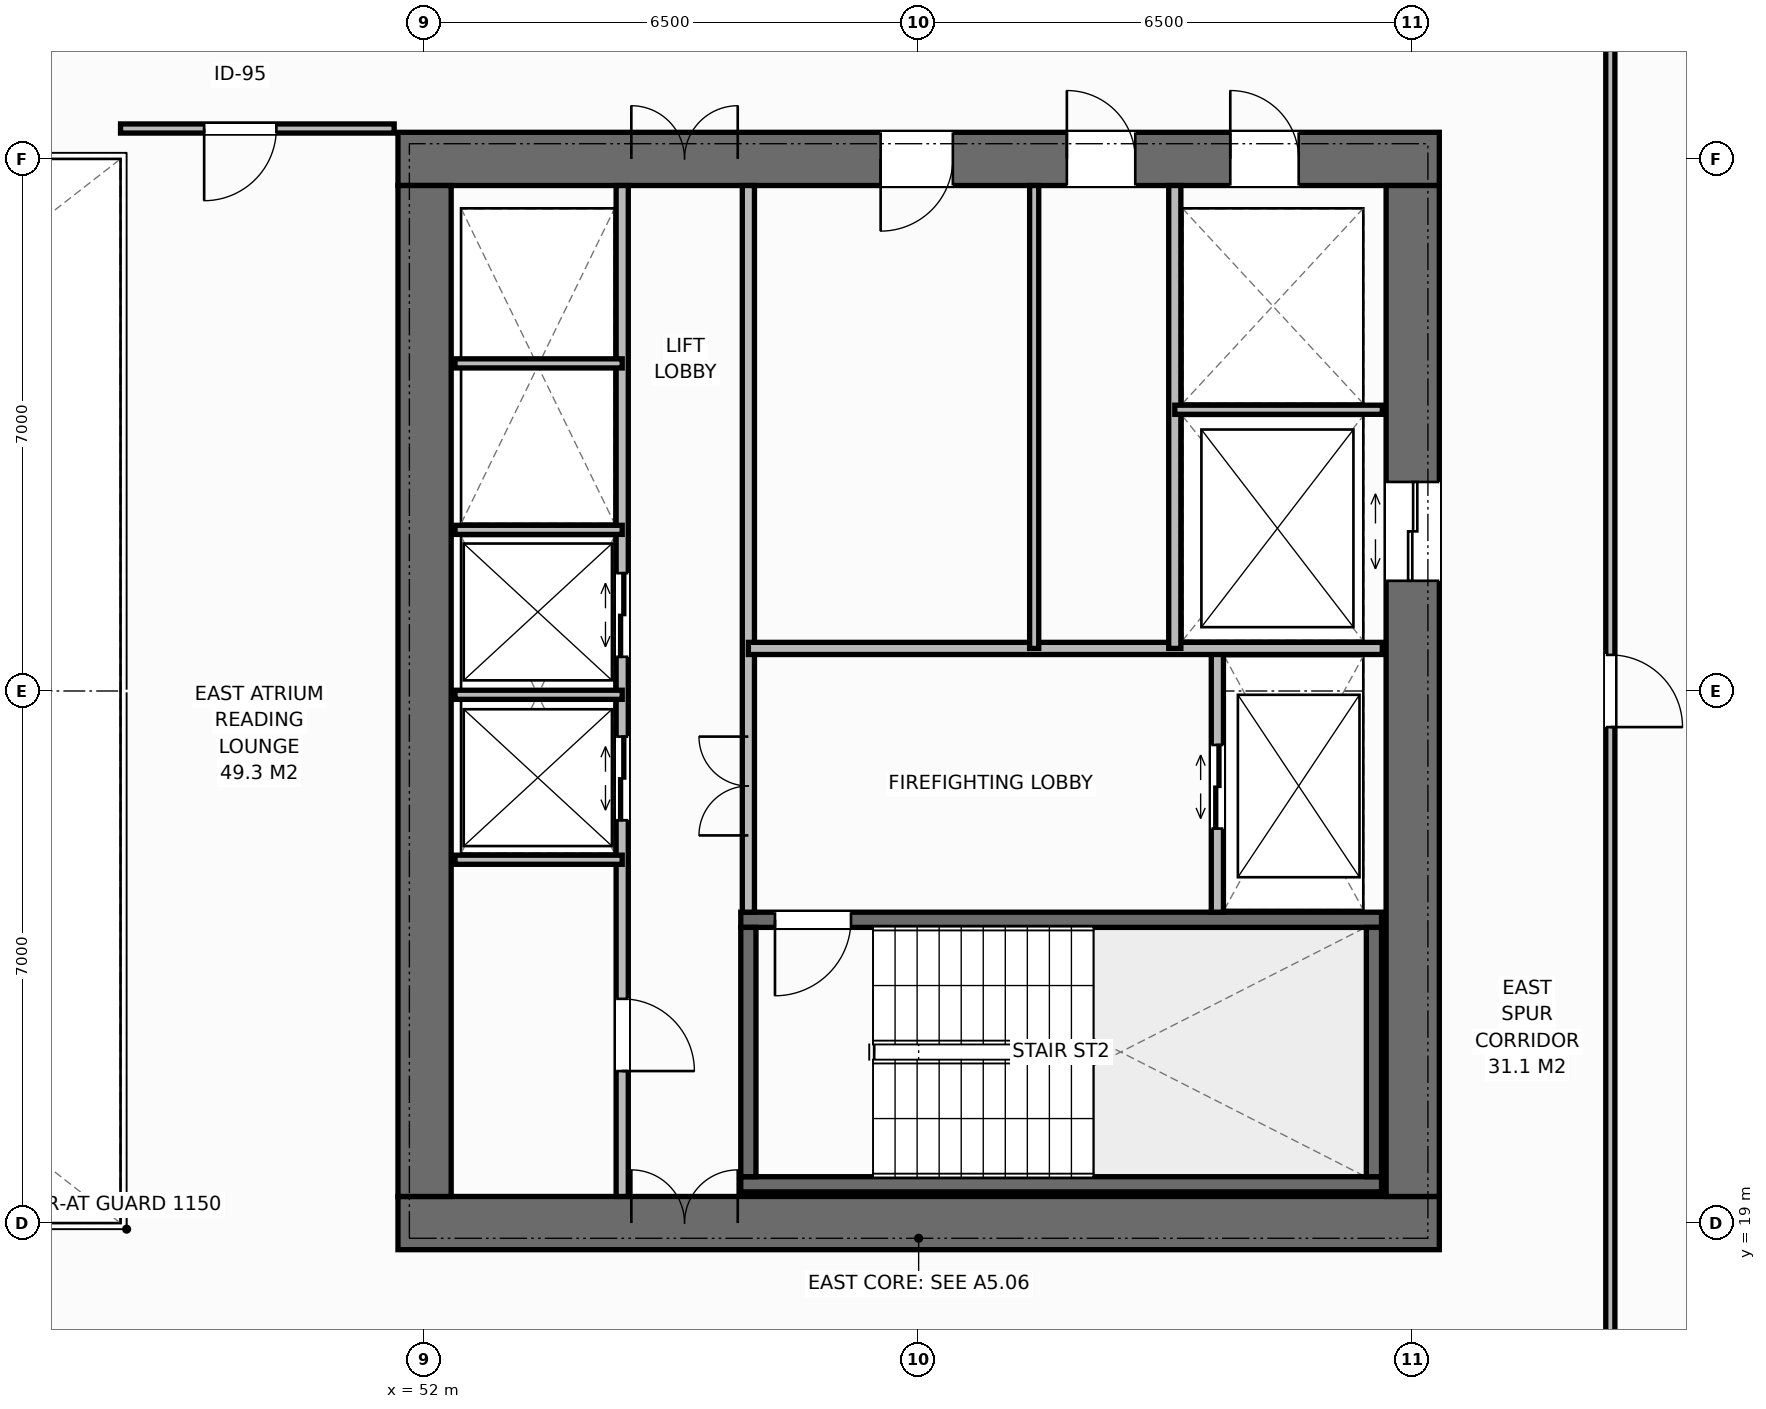
"""IFC4 building model, lengths in metres.
Left out: names, types, materials, properties, quantities, classifications, styles, units other than length and angle.
Written with IfcOpenShell. Run it as: python <this file> out.ifc"""

import sys

from ifc_helpers import new_model, si_unit, direction, frame, frame_2d, origin, place, context, subcontext, project, spatial, rectangle, extrude, element, fill, save


model = new_model("IFC4")
c1 = context("Model", 3, precision=1e-05, world=origin(), true_north=direction((0.0, 1.0)))
c2 = subcontext(c1, "Body", "Model", "MODEL_VIEW")
j1 = project(units=[si_unit("LENGTHUNIT", "METRE"), si_unit("PLANEANGLEUNIT", "RADIAN")], contexts=[c1])
p1 = place(None, origin())
s1 = spatial("IfcSite", under=j1, at=p1, CompositionType="ELEMENT")
p2 = place(p1, origin())
s2 = spatial("IfcBuilding", under=s1, at=p2, CompositionType="ELEMENT")
p3 = place(p2, frame((0.0, 0.0, 124.0)))
s3 = spatial("IfcBuildingStorey", under=s2, at=p3, CompositionType="ELEMENT", Elevation=124.0)
p4 = place(p3, frame((51.65, 19.0, 0.0), z_axis=(0.0, 0.0, 1.0), x_axis=(1.0, 0.0, 0.0)))
e1 = element("IfcWall", 1, at=p4, inside=s3, PredefinedType="SHEAR", context=c2, shape_type="SweptSolid", body=[
    extrude(rectangle(XDim=13.7, YDim=0.7, at=frame_2d((6.85, 0.0))), origin(), (0.0, 0.0, 1.0), 3.8),
])
p5 = place(p4, frame((3.07, 0.0, 0.0)))
e2 = element("IfcOpeningElement", 2, at=p5, cuts=e1, PredefinedType="OPENING", context=c2, shape_type="SweptSolid", body=[
    extrude(rectangle(XDim=1.4, YDim=2.2, at=frame_2d((0.7, 1.1))), frame((0.0, 0.36, 0.0), z_axis=(0.0, -1.0, 0.0), x_axis=(1.0, 0.0, 0.0)), (0.0, 0.0, 1.0), 0.72),
])
p6 = place(p3, frame((51.65, 33.0, 0.0), z_axis=(0.0, 0.0, 1.0), x_axis=(1.0, 0.0, 0.0)))
e3 = element("IfcWall", 3, at=p6, inside=s3, PredefinedType="SHEAR", context=c2, shape_type="SweptSolid", body=[
    extrude(rectangle(XDim=13.7, YDim=0.7, at=frame_2d((6.85, 0.0))), origin(), (0.0, 0.0, 1.0), 3.8),
])
p7 = place(p6, frame((3.07, 0.0, 0.0)))
e4 = element("IfcOpeningElement", 4, at=p7, cuts=e3, PredefinedType="OPENING", context=c2, shape_type="SweptSolid", body=[
    extrude(rectangle(XDim=1.4, YDim=2.2, at=frame_2d((0.7, 1.1))), frame((0.0, 0.36, 0.0), z_axis=(0.0, -1.0, 0.0), x_axis=(1.0, 0.0, 0.0)), (0.0, 0.0, 1.0), 0.72),
])
p8 = place(p6, frame((10.95, 0.0, 0.0)))
e5 = element("IfcOpeningElement", 5, at=p8, cuts=e3, PredefinedType="OPENING", context=c2, shape_type="SweptSolid", body=[
    extrude(rectangle(XDim=0.9, YDim=2.15, at=frame_2d((0.45, 1.075))), frame((0.0, 0.36, 0.0), z_axis=(0.0, -1.0, 0.0), x_axis=(1.0, 0.0, 0.0)), (0.0, 0.0, 1.0), 0.72),
])
p9 = place(p6, frame((6.35, 0.0, 0.0)))
e6 = element("IfcOpeningElement", 6, at=p9, cuts=e3, PredefinedType="OPENING", context=c2, shape_type="SweptSolid", body=[
    extrude(rectangle(XDim=0.95, YDim=2.15, at=frame_2d((0.475, 1.075))), frame((0.0, 0.36, 0.0), z_axis=(0.0, -1.0, 0.0), x_axis=(1.0, 0.0, 0.0)), (0.0, 0.0, 1.0), 0.72),
])
p10 = place(p6, frame((8.8, 0.0, 0.0)))
e7 = element("IfcOpeningElement", 7, at=p10, cuts=e3, PredefinedType="OPENING", context=c2, shape_type="SweptSolid", body=[
    extrude(rectangle(XDim=0.9, YDim=2.15, at=frame_2d((0.45, 1.075))), frame((0.0, 0.36, 0.0), z_axis=(0.0, -1.0, 0.0), x_axis=(1.0, 0.0, 0.0)), (0.0, 0.0, 1.0), 0.72),
])
p11 = place(p3, frame((52.0, 19.35, 0.0), z_axis=(0.0, 0.0, 1.0), x_axis=(0.0, 1.0, 0.0)))
e8 = element("IfcWall", 8, at=p11, inside=s3, PredefinedType="SHEAR", context=c2, shape_type="SweptSolid", body=[
    extrude(rectangle(XDim=13.3, YDim=0.7, at=frame_2d((6.65, 0.0))), origin(), (0.0, 0.0, 1.0), 3.8),
])
p12 = place(p3, frame((65.0, 19.35, 0.0), z_axis=(0.0, 0.0, 1.0), x_axis=(0.0, 1.0, 0.0)))
e9 = element("IfcWall", 9, at=p12, inside=s3, PredefinedType="SHEAR", context=c2, shape_type="SweptSolid", body=[
    extrude(rectangle(XDim=13.3, YDim=0.7, at=frame_2d((6.65, 0.0))), origin(), (0.0, 0.0, 1.0), 3.8),
])
p13 = place(p12, frame((8.1, 0.0, 0.0)))
e10 = element("IfcOpeningElement", 10, at=p13, cuts=e9, PredefinedType="OPENING", context=c2, shape_type="SweptSolid", body=[
    extrude(rectangle(XDim=1.3, YDim=2.2, at=frame_2d((0.65, 1.1))), frame((0.0, 0.36, 0.0), z_axis=(0.0, -1.0, 0.0), x_axis=(1.0, 0.0, 0.0)), (0.0, 0.0, 1.0), 0.72),
])
p14 = place(p3, frame((56.16, 19.51, 0.0), z_axis=(0.0, 0.0, 1.0), x_axis=(1.0, 0.0, 0.0)))
e11 = element("IfcWall", 11, at=p14, inside=s3, PredefinedType="SHEAR", context=c2, shape_type="SweptSolid", body=[
    extrude(rectangle(XDim=8.43, YDim=0.2, at=frame_2d((4.215, 0.0))), origin(), (0.0, 0.0, 1.0), 3.8),
])
p15 = place(p3, frame((56.16, 22.99, 0.0), z_axis=(0.0, 0.0, 1.0), x_axis=(1.0, 0.0, 0.0)))
e12 = element("IfcWall", 12, at=p15, inside=s3, PredefinedType="SHEAR", context=c2, shape_type="SweptSolid", body=[
    extrude(rectangle(XDim=8.43, YDim=0.2, at=frame_2d((4.215, 0.0))), origin(), (0.0, 0.0, 1.0), 3.8),
])
p16 = place(p15, frame((0.45, 0.0, 0.0)))
e13 = element("IfcOpeningElement", 13, at=p16, cuts=e12, PredefinedType="OPENING", context=c2, shape_type="SweptSolid", body=[
    extrude(rectangle(XDim=1.0, YDim=2.15, at=frame_2d((0.5, 1.075))), frame((0.0, 0.11, 0.0), z_axis=(0.0, -1.0, 0.0), x_axis=(1.0, 0.0, 0.0)), (0.0, 0.0, 1.0), 0.22),
])
for number, where, z_axis, x_axis in (
    (14, (56.26, 19.61, 0.0), (0.0, 0.0, 1.0), (0.0, 1.0, 0.0)),
    (15, (64.49, 19.61, 0.0), (0.0, 0.0, 1.0), (0.0, 1.0, 0.0)),
):
    element("IfcWall", number, at=place(p3, frame(where, z_axis=z_axis, x_axis=x_axis)), inside=s3, PredefinedType="SHEAR", context=c2, shape_type="SweptSolid", body=[
        extrude(rectangle(XDim=3.28, YDim=0.2, at=frame_2d((1.64, 0.0))), origin(), (0.0, 0.0, 1.0), 3.8),
    ])
p17 = place(p3, frame((54.6, 19.35, 0.0), z_axis=(0.0, 0.0, 1.0), x_axis=(0.0, 1.0, 0.0)))
e16 = element("IfcWall", 16, at=p17, inside=s3, PredefinedType="STANDARD", context=c2, shape_type="SweptSolid", body=[
    extrude(rectangle(XDim=13.3, YDim=0.16, at=frame_2d((6.65, 0.0))), origin(), (0.0, 0.0, 1.0), 3.565),
])
p18 = place(p17, frame((1.65, 0.0, 0.0)))
e17 = element("IfcOpeningElement", 17, at=p18, cuts=e16, PredefinedType="OPENING", context=c2, shape_type="SweptSolid", body=[
    extrude(rectangle(XDim=0.95, YDim=2.15, at=frame_2d((0.475, 1.075))), frame((0.0, 0.09, 0.0), z_axis=(0.0, -1.0, 0.0), x_axis=(1.0, 0.0, 0.0)), (0.0, 0.0, 1.0), 0.18),
])
p19 = place(p17, frame((4.95, 0.0, 0.0)))
e18 = element("IfcOpeningElement", 18, at=p19, cuts=e16, PredefinedType="OPENING", context=c2, shape_type="SweptSolid", body=[
    extrude(rectangle(XDim=1.1, YDim=2.2, at=frame_2d((0.55, 1.1))), frame((0.0, 0.09, 0.0), z_axis=(0.0, -1.0, 0.0), x_axis=(1.0, 0.0, 0.0)), (0.0, 0.0, 1.0), 0.18),
])
p20 = place(p17, frame((7.1, 0.0, 0.0)))
e19 = element("IfcOpeningElement", 19, at=p20, cuts=e16, PredefinedType="OPENING", context=c2, shape_type="SweptSolid", body=[
    extrude(rectangle(XDim=1.1, YDim=2.2, at=frame_2d((0.55, 1.1))), frame((0.0, 0.09, 0.0), z_axis=(0.0, -1.0, 0.0), x_axis=(1.0, 0.0, 0.0)), (0.0, 0.0, 1.0), 0.18),
])
p21 = place(p3, frame((56.26, 23.09, 0.0), z_axis=(0.0, 0.0, 1.0), x_axis=(0.0, 1.0, 0.0)))
e20 = element("IfcWall", 20, at=p21, inside=s3, PredefinedType="STANDARD", context=c2, shape_type="SweptSolid", body=[
    extrude(rectangle(XDim=9.56, YDim=0.16, at=frame_2d((4.78, 0.0))), origin(), (0.0, 0.0, 1.0), 3.565),
])
p22 = place(p21, frame((1.01, 0.0, 0.0)))
e21 = element("IfcOpeningElement", 21, at=p22, cuts=e20, PredefinedType="OPENING", context=c2, shape_type="SweptSolid", body=[
    extrude(rectangle(XDim=1.3, YDim=2.2, at=frame_2d((0.65, 1.1))), frame((0.0, 0.09, 0.0), z_axis=(0.0, -1.0, 0.0), x_axis=(1.0, 0.0, 0.0)), (0.0, 0.0, 1.0), 0.18),
])
for number, where, z_axis, x_axis in (
    (22, (52.4, 23.78, 0.0), (0.0, 0.0, 1.0), (1.0, 0.0, 0.0)),
    (23, (52.4, 25.95, 0.0), (0.0, 0.0, 1.0), (1.0, 0.0, 0.0)),
    (24, (52.4, 28.12, 0.0), (0.0, 0.0, 1.0), (1.0, 0.0, 0.0)),
    (25, (52.4, 30.31, 0.0), (0.0, 0.0, 1.0), (1.0, 0.0, 0.0)),
):
    element("IfcWall", number, at=place(p3, frame(where, z_axis=z_axis, x_axis=x_axis)), inside=s3, PredefinedType="PARTITIONING", context=c2, shape_type="SweptSolid", body=[
        extrude(rectangle(XDim=2.2, YDim=0.12, at=frame_2d((1.1, 0.0))), origin(), (0.0, 0.0, 1.0), 3.565),
    ])
p23 = place(p3, frame((62.43, 23.09, 0.0), z_axis=(0.0, 0.0, 1.0), x_axis=(0.0, 1.0, 0.0)))
e26 = element("IfcWall", 26, at=p23, inside=s3, PredefinedType="STANDARD", context=c2, shape_type="SweptSolid", body=[
    extrude(rectangle(XDim=3.47, YDim=0.16, at=frame_2d((1.735, 0.0))), origin(), (0.0, 0.0, 1.0), 3.565),
])
p24 = place(p23, frame((1.1, 0.0, 0.0)))
e27 = element("IfcOpeningElement", 27, at=p24, cuts=e26, PredefinedType="OPENING", context=c2, shape_type="SweptSolid", body=[
    extrude(rectangle(XDim=1.1, YDim=2.2, at=frame_2d((0.55, 1.1))), frame((0.0, 0.09, 0.0), z_axis=(0.0, -1.0, 0.0), x_axis=(1.0, 0.0, 0.0)), (0.0, 0.0, 1.0), 0.18),
])
p25 = place(p3, frame((56.26, 26.56, 0.0), z_axis=(0.0, 0.0, 1.0), x_axis=(1.0, 0.0, 0.0)))
e28 = element("IfcWall", 28, at=p25, inside=s3, PredefinedType="STANDARD", context=c2, shape_type="SweptSolid", body=[
    extrude(rectangle(XDim=8.34, YDim=0.16, at=frame_2d((4.17, 0.0))), origin(), (0.0, 0.0, 1.0), 3.565),
])
p26 = place(p3, frame((61.87, 26.56, 0.0), z_axis=(0.0, 0.0, 1.0), x_axis=(0.0, 1.0, 0.0)))
e29 = element("IfcWall", 29, at=p26, inside=s3, PredefinedType="STANDARD", context=c2, shape_type="SweptSolid", body=[
    extrude(rectangle(XDim=6.09, YDim=0.16, at=frame_2d((3.045, 0.0))), origin(), (0.0, 0.0, 1.0), 3.565),
])
p27 = place(p3, frame((61.87, 29.7, 0.0), z_axis=(0.0, 0.0, 1.0), x_axis=(1.0, 0.0, 0.0)))
e30 = element("IfcWall", 30, at=p27, inside=s3, PredefinedType="PARTITIONING", context=c2, shape_type="SweptSolid", body=[
    extrude(rectangle(XDim=2.73, YDim=0.12, at=frame_2d((1.365, 0.0))), origin(), (0.0, 0.0, 1.0), 3.565),
])
p28 = place(p3, frame((60.02, 26.56, 0.0), z_axis=(0.0, 0.0, 1.0), x_axis=(0.0, 1.0, 0.0)))
e31 = element("IfcWall", 31, at=p28, inside=s3, PredefinedType="PARTITIONING", context=c2, shape_type="SweptSolid", body=[
    extrude(rectangle(XDim=6.09, YDim=0.12, at=frame_2d((3.045, 0.0))), origin(), (0.0, 0.0, 1.0), 3.565),
])
p29 = place(p3, frame((48.0, 33.4, 0.0), z_axis=(0.0, 0.0, 1.0), x_axis=(1.0, 0.0, 0.0)))
e32 = element("IfcWall", 32, at=p29, inside=s3, PredefinedType="PARTITIONING", context=c2, shape_type="SweptSolid", body=[
    extrude(rectangle(XDim=3.6, YDim=0.12, at=frame_2d((1.8, 0.0))), origin(), (0.0, 0.0, 1.0), 3.565),
])
p30 = place(p29, frame((1.1, 0.0, 0.0)))
e33 = element("IfcOpeningElement", 33, at=p30, cuts=e32, PredefinedType="OPENING", context=c2, shape_type="SweptSolid", body=[
    extrude(rectangle(XDim=0.95, YDim=2.15, at=frame_2d((0.475, 1.075))), frame((0.0, 0.07, 0.0), z_axis=(0.0, -1.0, 0.0), x_axis=(1.0, 0.0, 0.0)), (0.0, 0.0, 1.0), 0.14),
])
p31 = place(p3, frame((67.6, 16.5, 0.0), z_axis=(0.0, 0.0, 1.0), x_axis=(0.0, 1.0, 0.0)))
e34 = element("IfcWall", 34, at=p31, inside=s3, PredefinedType="PARTITIONING", context=c2, shape_type="SweptSolid", body=[
    extrude(rectangle(XDim=19.0, YDim=0.12, at=frame_2d((9.5, 0.0))), origin(), (0.0, 0.0, 1.0), 3.565),
])
p32 = place(p31, frame((9.025, 0.0, 0.0)))
e35 = element("IfcOpeningElement", 35, at=p32, cuts=e34, PredefinedType="OPENING", context=c2, shape_type="SweptSolid", body=[
    extrude(rectangle(XDim=0.95, YDim=2.15, at=frame_2d((0.475, 1.075))), frame((0.0, 0.07, 0.0), z_axis=(0.0, -1.0, 0.0), x_axis=(1.0, 0.0, 0.0)), (0.0, 0.0, 1.0), 0.14),
])
p33 = place(p5, origin())
e36 = element("IfcDoor", 36, at=p33, inside=s3, OperationType="DOUBLE_DOOR_SINGLE_SWING", PredefinedType="DOOR", context=c2, shape_type="SweptSolid", body=[
    extrude(rectangle(XDim=1.4, YDim=2.2, at=frame_2d((0.7, 1.1))), frame((0.0, 0.125, 0.0), z_axis=(0.0, -1.0, 0.0), x_axis=(1.0, 0.0, 0.0)), (0.0, 0.0, 1.0), 0.05),
])
fill(e2, e36)
p34 = place(p7, origin())
e37 = element("IfcDoor", 37, at=p34, inside=s3, OperationType="DOUBLE_DOOR_SINGLE_SWING", PredefinedType="DOOR", context=c2, shape_type="SweptSolid", body=[
    extrude(rectangle(XDim=1.4, YDim=2.2, at=frame_2d((0.7, 1.1))), frame((0.0, -0.075, 0.0), z_axis=(0.0, -1.0, 0.0), x_axis=(1.0, 0.0, 0.0)), (0.0, 0.0, 1.0), 0.05),
])
fill(e4, e37)
p35 = place(p18, origin())
e38 = element("IfcDoor", 38, at=p35, inside=s3, OperationType="SINGLE_SWING_RIGHT", PredefinedType="DOOR", context=c2, shape_type="SweptSolid", body=[
    extrude(rectangle(XDim=0.95, YDim=2.15, at=frame_2d((0.475, 1.075))), frame((0.0, 0.025, 0.0), z_axis=(0.0, -1.0, 0.0), x_axis=(1.0, 0.0, 0.0)), (0.0, 0.0, 1.0), 0.05),
])
fill(e17, e38)
p36 = place(p19, origin())
e39 = element("IfcDoor", 39, at=p36, inside=s3, OperationType="DOUBLE_DOOR_SLIDING", PredefinedType="DOOR", context=c2, shape_type="SweptSolid", body=[
    extrude(rectangle(XDim=1.1, YDim=2.2, at=frame_2d((0.55, 1.1))), frame((0.0, 0.025, 0.0), z_axis=(0.0, -1.0, 0.0), x_axis=(1.0, 0.0, 0.0)), (0.0, 0.0, 1.0), 0.05),
])
fill(e18, e39)
p37 = place(p20, origin())
e40 = element("IfcDoor", 40, at=p37, inside=s3, OperationType="DOUBLE_DOOR_SLIDING", PredefinedType="DOOR", context=c2, shape_type="SweptSolid", body=[
    extrude(rectangle(XDim=1.1, YDim=2.2, at=frame_2d((0.55, 1.1))), frame((0.0, 0.025, 0.0), z_axis=(0.0, -1.0, 0.0), x_axis=(1.0, 0.0, 0.0)), (0.0, 0.0, 1.0), 0.05),
])
fill(e19, e40)
p38 = place(p16, origin())
e41 = element("IfcDoor", 41, at=p38, inside=s3, OperationType="SINGLE_SWING_RIGHT", PredefinedType="DOOR", context=c2, shape_type="SweptSolid", body=[
    extrude(rectangle(XDim=1.0, YDim=2.15, at=frame_2d((0.5, 1.075))), frame((0.0, 0.025, 0.0), z_axis=(0.0, -1.0, 0.0), x_axis=(1.0, 0.0, 0.0)), (0.0, 0.0, 1.0), 0.05),
])
fill(e13, e41)
p39 = place(p24, origin())
e42 = element("IfcDoor", 42, at=p39, inside=s3, OperationType="DOUBLE_DOOR_SLIDING", PredefinedType="DOOR", context=c2, shape_type="SweptSolid", body=[
    extrude(rectangle(XDim=1.1, YDim=2.2, at=frame_2d((0.55, 1.1))), frame((0.0, 0.025, 0.0), z_axis=(0.0, -1.0, 0.0), x_axis=(1.0, 0.0, 0.0)), (0.0, 0.0, 1.0), 0.05),
])
fill(e27, e42)
p40 = place(p22, origin())
e43 = element("IfcDoor", 43, at=p40, inside=s3, OperationType="DOUBLE_DOOR_SINGLE_SWING", PredefinedType="DOOR", context=c2, shape_type="SweptSolid", body=[
    extrude(rectangle(XDim=1.3, YDim=2.2, at=frame_2d((0.65, 1.1))), frame((0.0, 0.025, 0.0), z_axis=(0.0, -1.0, 0.0), x_axis=(1.0, 0.0, 0.0)), (0.0, 0.0, 1.0), 0.05),
])
fill(e21, e43)
p41 = place(p13, origin())
e44 = element("IfcDoor", 44, at=p41, inside=s3, OperationType="DOUBLE_DOOR_SLIDING", PredefinedType="DOOR", context=c2, shape_type="SweptSolid", body=[
    extrude(rectangle(XDim=1.3, YDim=2.2, at=frame_2d((0.65, 1.1))), frame((0.0, 0.025, 0.0), z_axis=(0.0, -1.0, 0.0), x_axis=(1.0, 0.0, 0.0)), (0.0, 0.0, 1.0), 0.05),
])
fill(e10, e44)
p42 = place(p8, origin())
e45 = element("IfcDoor", 45, at=p42, inside=s3, OperationType="SINGLE_SWING_LEFT", PredefinedType="DOOR", context=c2, shape_type="SweptSolid", body=[
    extrude(rectangle(XDim=0.9, YDim=2.15, at=frame_2d((0.45, 1.075))), frame((0.0, -0.075, 0.0), z_axis=(0.0, -1.0, 0.0), x_axis=(1.0, 0.0, 0.0)), (0.0, 0.0, 1.0), 0.05),
])
fill(e5, e45)
p43 = place(p9, origin())
e46 = element("IfcDoor", 46, at=p43, inside=s3, OperationType="SINGLE_SWING_RIGHT", PredefinedType="DOOR", context=c2, shape_type="SweptSolid", body=[
    extrude(rectangle(XDim=0.95, YDim=2.15, at=frame_2d((0.475, 1.075))), frame((0.0, -0.075, 0.0), z_axis=(0.0, -1.0, 0.0), x_axis=(1.0, 0.0, 0.0)), (0.0, 0.0, 1.0), 0.05),
])
fill(e6, e46)
p44 = place(p10, origin())
e47 = element("IfcDoor", 47, at=p44, inside=s3, OperationType="SINGLE_SWING_LEFT", PredefinedType="DOOR", context=c2, shape_type="SweptSolid", body=[
    extrude(rectangle(XDim=0.9, YDim=2.15, at=frame_2d((0.45, 1.075))), frame((0.0, -0.075, 0.0), z_axis=(0.0, -1.0, 0.0), x_axis=(1.0, 0.0, 0.0)), (0.0, 0.0, 1.0), 0.05),
])
fill(e7, e47)
p45 = place(p30, origin())
e48 = element("IfcDoor", 48, at=p45, inside=s3, OperationType="SINGLE_SWING_RIGHT", PredefinedType="DOOR", context=c2, shape_type="SweptSolid", body=[
    extrude(rectangle(XDim=0.95, YDim=2.15, at=frame_2d((0.475, 1.075))), frame((0.0, 0.025, 0.0), z_axis=(0.0, -1.0, 0.0), x_axis=(1.0, 0.0, 0.0)), (0.0, 0.0, 1.0), 0.05),
])
fill(e33, e48)
p46 = place(p32, origin())
e49 = element("IfcDoor", 49, at=p46, inside=s3, OperationType="SINGLE_SWING_RIGHT", PredefinedType="DOOR", context=c2, shape_type="SweptSolid", body=[
    extrude(rectangle(XDim=0.95, YDim=2.15, at=frame_2d((0.475, 1.075))), frame((0.0, 0.025, 0.0), z_axis=(0.0, -1.0, 0.0), x_axis=(1.0, 0.0, 0.0)), (0.0, 0.0, 1.0), 0.05),
])
fill(e35, e49)
save(model, sys.argv[1])
